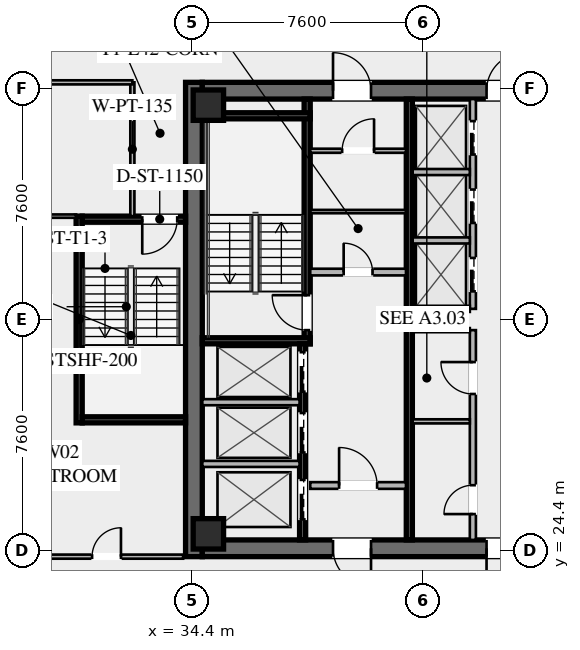
"""IFC4 building model, lengths in metres.
Left out: names, types, materials, properties, quantities, classifications, styles, units other than length and angle.
Written with IfcOpenShell. Run it as: python <this file> out.ifc"""

import sys

from ifc_helpers import new_model, si_unit, direction, frame, frame_2d, origin, origin_2d, place, context, subcontext, project, spatial, rectangle, hollow_rectangle, extrude, element, fill, save


model = new_model("IFC4")
c1 = context("Model", 3, precision=1e-05, world=origin(), true_north=direction((0.0, 1.0)))
c2 = subcontext(c1, "Body", "Model", "MODEL_VIEW")
j1 = project(units=[si_unit("LENGTHUNIT", "METRE"), si_unit("PLANEANGLEUNIT", "RADIAN")], contexts=[c1])
p1 = place(None, origin())
s1 = spatial("IfcSite", under=j1, at=p1, CompositionType="ELEMENT")
p2 = place(p1, origin())
s2 = spatial("IfcBuilding", under=s1, at=p2, CompositionType="ELEMENT")
p3 = place(p2, frame((0.0, 0.0, 157.0)))
s3 = spatial("IfcBuildingStorey", under=s2, at=p3, CompositionType="ELEMENT", Elevation=157.0)
p4 = place(p3, frame((34.475, 24.2, 0.0), z_axis=(0.0, 0.0, 1.0), x_axis=(0.0, 1.0, 0.0)))
e1 = element("IfcWall", 1, at=p4, inside=s3, PredefinedType="SHEAR", context=c2, shape_type="SweptSolid", body=[
    extrude(rectangle(XDim=15.6, YDim=0.55, at=frame_2d((7.8, 0.0))), origin(), (0.0, 0.0, 1.0), 3.55),
])
p5 = place(p3, frame((49.25, 24.475, 0.0), z_axis=(0.0, 0.0, 1.0), x_axis=(-1.0, 0.0, 0.0)))
e2 = element("IfcWall", 2, at=p5, inside=s3, PredefinedType="SHEAR", context=c2, shape_type="SweptSolid", body=[
    extrude(rectangle(XDim=14.5, YDim=0.55, at=frame_2d((7.25, 0.0))), origin(), (0.0, 0.0, 1.0), 3.55),
])
p6 = place(p5, frame((8.95, 0.0, 0.0)))
e3 = element("IfcOpeningElement", 3, at=p6, cuts=e2, PredefinedType="OPENING", context=c2, shape_type="SweptSolid", body=[
    extrude(rectangle(XDim=1.25, YDim=2.25, at=frame_2d((0.625, 1.125))), frame((0.0, 0.285, 0.0), z_axis=(0.0, -1.0, 0.0), x_axis=(1.0, 0.0, 0.0)), (0.0, 0.0, 1.0), 0.57),
])
p7 = place(p5, frame((3.9, 0.0, 0.0)))
e4 = element("IfcOpeningElement", 4, at=p7, cuts=e2, PredefinedType="OPENING", context=c2, shape_type="SweptSolid", body=[
    extrude(rectangle(XDim=1.25, YDim=2.25, at=frame_2d((0.625, 1.125))), frame((0.0, 0.285, 0.0), z_axis=(0.0, -1.0, 0.0), x_axis=(1.0, 0.0, 0.0)), (0.0, 0.0, 1.0), 0.57),
])
p8 = place(p3, frame((34.75, 39.525, 0.0), z_axis=(0.0, 0.0, 1.0), x_axis=(1.0, 0.0, 0.0)))
e5 = element("IfcWall", 5, at=p8, inside=s3, PredefinedType="SHEAR", context=c2, shape_type="SweptSolid", body=[
    extrude(rectangle(XDim=14.5, YDim=0.55, at=frame_2d((7.25, 0.0))), origin(), (0.0, 0.0, 1.0), 3.55),
])
p9 = place(p8, frame((4.3, 0.0, 0.0)))
e6 = element("IfcOpeningElement", 6, at=p9, cuts=e5, PredefinedType="OPENING", context=c2, shape_type="SweptSolid", body=[
    extrude(rectangle(XDim=1.25, YDim=2.25, at=frame_2d((0.625, 1.125))), frame((0.0, 0.285, 0.0), z_axis=(0.0, -1.0, 0.0), x_axis=(1.0, 0.0, 0.0)), (0.0, 0.0, 1.0), 0.57),
])
p10 = place(p8, frame((9.35, 0.0, 0.0)))
e7 = element("IfcOpeningElement", 7, at=p10, cuts=e5, PredefinedType="OPENING", context=c2, shape_type="SweptSolid", body=[
    extrude(rectangle(XDim=1.25, YDim=2.25, at=frame_2d((0.625, 1.125))), frame((0.0, 0.285, 0.0), z_axis=(0.0, -1.0, 0.0), x_axis=(1.0, 0.0, 0.0)), (0.0, 0.0, 1.0), 0.57),
])
for number, where, z_axis, x_axis in (
    (8, (34.95, 24.95, 0.0), (0.0, 0.0, 1.0), (1.0, 0.0, 0.0)),
    (9, (34.95, 39.05, 0.0), (0.0, 0.0, 1.0), (1.0, 0.0, 0.0)),
):
    element("IfcColumn", number, at=place(p3, frame(where, z_axis=z_axis, x_axis=x_axis)), inside=s3, PredefinedType="COLUMN", context=c2, shape_type="SweptSolid", body=[
        extrude(hollow_rectangle(XDim=1.0, YDim=1.0, WallThickness=0.04, at=origin_2d()), origin(), (0.0, 0.0, 1.0), 3.37),
    ])
p11 = place(p3, frame((38.2, 31.2, 0.0), z_axis=(0.0, 0.0, 1.0), x_axis=(0.0, 1.0, 0.0)))
e10 = element("IfcWall", 10, at=p11, inside=s3, PredefinedType="SHEAR", context=c2, shape_type="SweptSolid", body=[
    extrude(rectangle(XDim=8.05, YDim=0.2, at=frame_2d((4.025, 0.0))), origin(), (0.0, 0.0, 1.0), 3.37),
])
p12 = place(p11, frame((0.45, 0.0, 0.0)))
e11 = element("IfcOpeningElement", 11, at=p12, cuts=e10, PredefinedType="OPENING", context=c2, shape_type="SweptSolid", body=[
    extrude(rectangle(XDim=1.15, YDim=2.2, at=frame_2d((0.575, 1.1))), frame((0.0, 0.11, 0.0), z_axis=(0.0, -1.0, 0.0), x_axis=(1.0, 0.0, 0.0)), (0.0, 0.0, 1.0), 0.22),
])
for number, where, z_axis, x_axis in (
    (12, (34.75, 31.3, 0.0), (0.0, 0.0, 1.0), (1.0, 0.0, 0.0)),
    (13, (34.75, 38.7, 0.0), (0.0, 0.0, 1.0), (1.0, 0.0, 0.0)),
):
    element("IfcWall", number, at=place(p3, frame(where, z_axis=z_axis, x_axis=x_axis)), inside=s3, PredefinedType="SHEAR", context=c2, shape_type="SweptSolid", body=[
        extrude(rectangle(XDim=3.55, YDim=0.2, at=frame_2d((1.775, 0.0))), origin(), (0.0, 0.0, 1.0), 3.37),
    ])
p13 = place(p3, frame((41.56, 24.75, 0.0), z_axis=(0.0, 0.0, 1.0), x_axis=(0.0, 1.0, 0.0)))
e14 = element("IfcWall", 14, at=p13, inside=s3, PredefinedType="SHEAR", context=c2, shape_type="SweptSolid", body=[
    extrude(rectangle(XDim=14.5, YDim=0.2, at=frame_2d((7.25, 0.0))), origin(), (0.0, 0.0, 1.0), 3.37),
])
p14 = place(p3, frame((38.3, 33.56, 0.0), z_axis=(0.0, 0.0, 1.0), x_axis=(1.0, 0.0, 0.0)))
e15 = element("IfcWall", 15, at=p14, inside=s3, PredefinedType="SOLIDWALL", context=c2, shape_type="SweptSolid", body=[
    extrude(rectangle(XDim=3.15, YDim=0.22, at=frame_2d((1.575, 0.0))), origin(), (0.0, 0.0, 1.0), 2.723),
])
p15 = place(p14, frame((1.1, 0.0, 0.0)))
e16 = element("IfcOpeningElement", 16, at=p15, cuts=e15, PredefinedType="OPENING", context=c2, shape_type="SweptSolid", body=[
    extrude(rectangle(XDim=0.95, YDim=2.05, at=frame_2d((0.475, 1.025))), frame((0.0, 0.12, 0.0), z_axis=(0.0, -1.0, 0.0), x_axis=(1.0, 0.0, 0.0)), (0.0, 0.0, 1.0), 0.24),
])
p16 = place(p3, frame((38.3, 26.54, 0.0), z_axis=(0.0, 0.0, 1.0), x_axis=(1.0, 0.0, 0.0)))
e17 = element("IfcWall", 17, at=p16, inside=s3, PredefinedType="SOLIDWALL", context=c2, shape_type="SweptSolid", body=[
    extrude(rectangle(XDim=3.15, YDim=0.22, at=frame_2d((1.575, 0.0))), origin(), (0.0, 0.0, 1.0), 2.723),
])
p17 = place(p16, frame((0.95, 0.0, 0.0)))
e18 = element("IfcOpeningElement", 18, at=p17, cuts=e17, PredefinedType="OPENING", context=c2, shape_type="SweptSolid", body=[
    extrude(rectangle(XDim=1.25, YDim=2.25, at=frame_2d((0.625, 1.125))), frame((0.0, 0.12, 0.0), z_axis=(0.0, -1.0, 0.0), x_axis=(1.0, 0.0, 0.0)), (0.0, 0.0, 1.0), 0.24),
])
p18 = place(p3, frame((38.05, 24.75, 0.0), z_axis=(0.0, 0.0, 1.0), x_axis=(0.0, 1.0, 0.0)))
e19 = element("IfcWall", 19, at=p18, inside=s3, PredefinedType="SHEAR", context=c2, shape_type="SweptSolid", body=[
    extrude(rectangle(XDim=6.45, YDim=0.2, at=frame_2d((3.225, 0.0))), origin(), (0.0, 0.0, 1.0), 3.37),
])
p19 = place(p18, frame((4.875, 0.0, 0.0)))
e20 = element("IfcOpeningElement", 20, at=p19, cuts=e19, PredefinedType="OPENING", context=c2, shape_type="SweptSolid", body=[
    extrude(rectangle(XDim=1.3, YDim=2.25, at=frame_2d((0.65, 1.125))), frame((0.0, 0.11, 0.0), z_axis=(0.0, -1.0, 0.0), x_axis=(1.0, 0.0, 0.0)), (0.0, 0.0, 1.0), 0.22),
])
p20 = place(p18, frame((2.875, 0.0, 0.0)))
e21 = element("IfcOpeningElement", 21, at=p20, cuts=e19, PredefinedType="OPENING", context=c2, shape_type="SweptSolid", body=[
    extrude(rectangle(XDim=1.3, YDim=2.25, at=frame_2d((0.65, 1.125))), frame((0.0, 0.11, 0.0), z_axis=(0.0, -1.0, 0.0), x_axis=(1.0, 0.0, 0.0)), (0.0, 0.0, 1.0), 0.22),
])
p21 = place(p18, frame((0.675, 0.0, 0.0)))
e22 = element("IfcOpeningElement", 22, at=p21, cuts=e19, PredefinedType="OPENING", context=c2, shape_type="SweptSolid", body=[
    extrude(rectangle(XDim=1.3, YDim=2.25, at=frame_2d((0.65, 1.125))), frame((0.0, 0.11, 0.0), z_axis=(0.0, -1.0, 0.0), x_axis=(1.0, 0.0, 0.0)), (0.0, 0.0, 1.0), 0.22),
])
for number, where, z_axis, x_axis in (
    (23, (34.75, 27.25, 0.0), (0.0, 0.0, 1.0), (1.0, 0.0, 0.0)),
    (24, (34.75, 29.28, 0.0), (0.0, 0.0, 1.0), (1.0, 0.0, 0.0)),
):
    element("IfcWall", number, at=place(p3, frame(where, z_axis=z_axis, x_axis=x_axis)), inside=s3, PredefinedType="SOLIDWALL", context=c2, shape_type="SweptSolid", body=[
        extrude(rectangle(XDim=3.2, YDim=0.2, at=frame_2d((1.6, 0.0))), origin(), (0.0, 0.0, 1.0), 3.37),
    ])
p22 = place(p3, frame((38.3, 37.55, 0.0), z_axis=(0.0, 0.0, 1.0), x_axis=(1.0, 0.0, 0.0)))
e25 = element("IfcWall", 25, at=p22, inside=s3, PredefinedType="PARTITIONING", context=c2, shape_type="SweptSolid", body=[
    extrude(rectangle(XDim=3.15, YDim=0.135, at=frame_2d((1.575, 0.0))), origin(), (0.0, 0.0, 1.0), 2.723),
])
p23 = place(p22, frame((1.05, 0.0, 0.0)))
e26 = element("IfcOpeningElement", 26, at=p23, cuts=e25, PredefinedType="OPENING", context=c2, shape_type="SweptSolid", body=[
    extrude(rectangle(XDim=1.05, YDim=2.2, at=frame_2d((0.525, 1.1))), frame((0.0, 0.077, 0.0), z_axis=(0.0, -1.0, 0.0), x_axis=(1.0, 0.0, 0.0)), (0.0, 0.0, 1.0), 0.155),
])
p24 = place(p3, frame((38.3, 35.55, 0.0), z_axis=(0.0, 0.0, 1.0), x_axis=(1.0, 0.0, 0.0)))
e27 = element("IfcWall", 27, at=p24, inside=s3, PredefinedType="PARTITIONING", context=c2, shape_type="SweptSolid", body=[
    extrude(rectangle(XDim=3.15, YDim=0.11, at=frame_2d((1.575, 0.0))), origin(), (0.0, 0.0, 1.0), 2.723),
])
p25 = place(p3, frame((43.65, 24.75, 0.0), z_axis=(0.0, 0.0, 1.0), x_axis=(0.0, 1.0, 0.0)))
e28 = element("IfcWall", 28, at=p25, inside=s3, PredefinedType="SOLIDWALL", context=c2, shape_type="SweptSolid", body=[
    extrude(rectangle(XDim=6.9, YDim=0.2, at=frame_2d((3.45, 0.0))), origin(), (0.0, 0.0, 1.0), 2.723),
])
p26 = place(p25, frame((0.85, 0.0, 0.0)))
e29 = element("IfcOpeningElement", 29, at=p26, cuts=e28, PredefinedType="OPENING", context=c2, shape_type="SweptSolid", body=[
    extrude(rectangle(XDim=0.95, YDim=2.05, at=frame_2d((0.475, 1.025))), frame((0.0, 0.11, 0.0), z_axis=(0.0, -1.0, 0.0), x_axis=(1.0, 0.0, 0.0)), (0.0, 0.0, 1.0), 0.22),
])
p27 = place(p25, frame((4.8, 0.0, 0.0)))
e30 = element("IfcOpeningElement", 30, at=p27, cuts=e28, PredefinedType="OPENING", context=c2, shape_type="SweptSolid", body=[
    extrude(rectangle(XDim=1.05, YDim=2.2, at=frame_2d((0.525, 1.1))), frame((0.0, 0.11, 0.0), z_axis=(0.0, -1.0, 0.0), x_axis=(1.0, 0.0, 0.0)), (0.0, 0.0, 1.0), 0.22),
])
for number, where, z_axis, x_axis in (
    (31, (41.67, 31.65, 0.0), (0.0, 0.0, 1.0), (1.0, 0.0, 0.0)),
    (32, (41.67, 28.65, 0.0), (0.0, 0.0, 1.0), (1.0, 0.0, 0.0)),
):
    element("IfcWall", number, at=place(p3, frame(where, z_axis=z_axis, x_axis=x_axis)), inside=s3, PredefinedType="PARTITIONING", context=c2, shape_type="SweptSolid", body=[
        extrude(rectangle(XDim=1.88, YDim=0.135, at=frame_2d((0.94, 0.0))), origin(), (0.0, 0.0, 1.0), 2.723),
    ])
p28 = place(p3, frame((43.65, 32.35, 0.0), z_axis=(0.0, 0.0, 1.0), x_axis=(0.0, 1.0, 0.0)))
e33 = element("IfcWall", 33, at=p28, inside=s3, PredefinedType="SOLIDWALL", context=c2, shape_type="SweptSolid", body=[
    extrude(rectangle(XDim=6.9, YDim=0.2, at=frame_2d((3.45, 0.0))), origin(), (0.0, 0.0, 1.0), 3.37),
])
p29 = place(p28, frame((0.575, 0.0, 0.0)))
e34 = element("IfcOpeningElement", 34, at=p29, cuts=e33, PredefinedType="OPENING", context=c2, shape_type="SweptSolid", body=[
    extrude(rectangle(XDim=1.1, YDim=2.2, at=frame_2d((0.55, 1.1))), frame((0.0, 0.11, 0.0), z_axis=(0.0, -1.0, 0.0), x_axis=(1.0, 0.0, 0.0)), (0.0, 0.0, 1.0), 0.22),
])
p30 = place(p28, frame((2.825, 0.0, 0.0)))
e35 = element("IfcOpeningElement", 35, at=p30, cuts=e33, PredefinedType="OPENING", context=c2, shape_type="SweptSolid", body=[
    extrude(rectangle(XDim=1.1, YDim=2.2, at=frame_2d((0.55, 1.1))), frame((0.0, 0.11, 0.0), z_axis=(0.0, -1.0, 0.0), x_axis=(1.0, 0.0, 0.0)), (0.0, 0.0, 1.0), 0.22),
])
p31 = place(p28, frame((5.075, 0.0, 0.0)))
e36 = element("IfcOpeningElement", 36, at=p31, cuts=e33, PredefinedType="OPENING", context=c2, shape_type="SweptSolid", body=[
    extrude(rectangle(XDim=1.1, YDim=2.2, at=frame_2d((0.55, 1.1))), frame((0.0, 0.11, 0.0), z_axis=(0.0, -1.0, 0.0), x_axis=(1.0, 0.0, 0.0)), (0.0, 0.0, 1.0), 0.22),
])
for number, where, z_axis, x_axis in (
    (37, (41.67, 32.35, 0.0), (0.0, 0.0, 1.0), (1.0, 0.0, 0.0)),
    (38, (41.67, 34.6, 0.0), (0.0, 0.0, 1.0), (1.0, 0.0, 0.0)),
    (39, (41.67, 36.85, 0.0), (0.0, 0.0, 1.0), (1.0, 0.0, 0.0)),
):
    element("IfcWall", number, at=place(p3, frame(where, z_axis=z_axis, x_axis=x_axis)), inside=s3, PredefinedType="SOLIDWALL", context=c2, shape_type="SweptSolid", body=[
        extrude(rectangle(XDim=1.88, YDim=0.2, at=frame_2d((0.94, 0.0))), origin(), (0.0, 0.0, 1.0), 3.37),
    ])
p32 = place(p3, frame((30.7, 28.6, 0.0), z_axis=(0.0, 0.0, 1.0), x_axis=(0.0, 1.0, 0.0)))
e40 = element("IfcWall", 40, at=p32, inside=s3, PredefinedType="SHEAR", context=c2, shape_type="SweptSolid", body=[
    extrude(rectangle(XDim=6.8, YDim=0.2, at=frame_2d((3.4, 0.0))), origin(), (0.0, 0.0, 1.0), 3.37),
])
p33 = place(p3, frame((34.2, 35.3, 0.0), z_axis=(0.0, 0.0, 1.0), x_axis=(-1.0, 0.0, 0.0)))
e41 = element("IfcWall", 41, at=p33, inside=s3, PredefinedType="SHEAR", context=c2, shape_type="SweptSolid", body=[
    extrude(rectangle(XDim=3.4, YDim=0.2, at=frame_2d((1.7, 0.0))), origin(), (0.0, 0.0, 1.0), 3.37),
])
p34 = place(p33, frame((0.275, 0.0, 0.0)))
e42 = element("IfcOpeningElement", 42, at=p34, cuts=e41, PredefinedType="OPENING", context=c2, shape_type="SweptSolid", body=[
    extrude(rectangle(XDim=1.15, YDim=2.2, at=frame_2d((0.575, 1.1))), frame((0.0, 0.11, 0.0), z_axis=(0.0, -1.0, 0.0), x_axis=(1.0, 0.0, 0.0)), (0.0, 0.0, 1.0), 0.22),
])
p35 = place(p3, frame((30.8, 28.7, 0.0), z_axis=(0.0, 0.0, 1.0), x_axis=(1.0, 0.0, 0.0)))
e43 = element("IfcWall", 43, at=p35, inside=s3, PredefinedType="SHEAR", context=c2, shape_type="SweptSolid", body=[
    extrude(rectangle(XDim=3.4, YDim=0.2, at=frame_2d((1.7, 0.0))), origin(), (0.0, 0.0, 1.0), 3.37),
])
p36 = place(p3, frame((32.45, 35.4, 0.0), z_axis=(0.0, 0.0, 1.0), x_axis=(0.0, 1.0, 0.0)))
e44 = element("IfcWall", 44, at=p36, inside=s3, PredefinedType="PARTITIONING", context=c2, shape_type="SweptSolid", body=[
    extrude(rectangle(XDim=4.4, YDim=0.135, at=frame_2d((2.2, 0.0))), origin(), (0.0, 0.0, 1.0), 2.723),
])
p37 = place(p3, frame((32.45, 39.8, 0.0), z_axis=(0.0, 0.0, 1.0), x_axis=(-1.0, 0.0, 0.0)))
e45 = element("IfcWall", 45, at=p37, inside=s3, PredefinedType="PARTITIONING", context=c2, shape_type="SweptSolid", body=[
    extrude(rectangle(XDim=8.13, YDim=0.135, at=frame_2d((4.065, 0.0))), origin(), (0.0, 0.0, 1.0), 2.723),
])
p38 = place(p37, frame((3.24, 0.0, 0.0)))
e46 = element("IfcOpeningElement", 46, at=p38, cuts=e45, PredefinedType="OPENING", context=c2, shape_type="SweptSolid", body=[
    extrude(rectangle(XDim=0.95, YDim=2.05, at=frame_2d((0.475, 1.025))), frame((0.0, 0.077, 0.0), z_axis=(0.0, -1.0, 0.0), x_axis=(1.0, 0.0, 0.0)), (0.0, 0.0, 1.0), 0.155),
])
p39 = place(p3, frame((24.32, 24.2, 0.0), z_axis=(0.0, 0.0, 1.0), x_axis=(1.0, 0.0, 0.0)))
e47 = element("IfcWall", 47, at=p39, inside=s3, PredefinedType="PARTITIONING", context=c2, shape_type="SweptSolid", body=[
    extrude(rectangle(XDim=9.8, YDim=0.135, at=frame_2d((4.9, 0.0))), origin(), (0.0, 0.0, 1.0), 2.723),
])
p40 = place(p39, frame((6.805, 0.0, 0.0)))
e48 = element("IfcOpeningElement", 48, at=p40, cuts=e47, PredefinedType="OPENING", context=c2, shape_type="SweptSolid", body=[
    extrude(rectangle(XDim=0.95, YDim=2.05, at=frame_2d((0.475, 1.025))), frame((0.0, 0.077, 0.0), z_axis=(0.0, -1.0, 0.0), x_axis=(1.0, 0.0, 0.0)), (0.0, 0.0, 1.0), 0.155),
])
p41 = place(p3, frame((30.6, 35.4, 0.0), z_axis=(0.0, 0.0, 1.0), x_axis=(-1.0, 0.0, 0.0)))
e49 = element("IfcWall", 49, at=p41, inside=s3, PredefinedType="PARTITIONING", context=c2, shape_type="SweptSolid", body=[
    extrude(rectangle(XDim=6.28, YDim=0.11, at=frame_2d((3.14, 0.0))), origin(), (0.0, 0.0, 1.0), 2.723),
])
p42 = place(p9, origin())
e50 = element("IfcDoor", 50, at=p42, inside=s3, OperationType="SINGLE_SWING_LEFT", PredefinedType="DOOR", context=c2, shape_type="SweptSolid", body=[
    extrude(rectangle(XDim=1.25, YDim=2.25, at=frame_2d((0.625, 1.125))), frame((0.0, 0.025, 0.0), z_axis=(0.0, -1.0, 0.0), x_axis=(1.0, 0.0, 0.0)), (0.0, 0.0, 1.0), 0.05),
])
fill(e6, e50)
p43 = place(p10, origin())
e51 = element("IfcDoor", 51, at=p43, inside=s3, OperationType="SINGLE_SWING_RIGHT", PredefinedType="DOOR", context=c2, shape_type="SweptSolid", body=[
    extrude(rectangle(XDim=1.25, YDim=2.25, at=frame_2d((0.625, 1.125))), frame((0.0, 0.025, 0.0), z_axis=(0.0, -1.0, 0.0), x_axis=(1.0, 0.0, 0.0)), (0.0, 0.0, 1.0), 0.05),
])
fill(e7, e51)
p44 = place(p6, origin())
e52 = element("IfcDoor", 52, at=p44, inside=s3, OperationType="SINGLE_SWING_LEFT", PredefinedType="DOOR", context=c2, shape_type="SweptSolid", body=[
    extrude(rectangle(XDim=1.25, YDim=2.25, at=frame_2d((0.625, 1.125))), frame((0.0, 0.025, 0.0), z_axis=(0.0, -1.0, 0.0), x_axis=(1.0, 0.0, 0.0)), (0.0, 0.0, 1.0), 0.05),
])
fill(e3, e52)
p45 = place(p7, origin())
e53 = element("IfcDoor", 53, at=p45, inside=s3, OperationType="SINGLE_SWING_RIGHT", PredefinedType="DOOR", context=c2, shape_type="SweptSolid", body=[
    extrude(rectangle(XDim=1.25, YDim=2.25, at=frame_2d((0.625, 1.125))), frame((0.0, 0.025, 0.0), z_axis=(0.0, -1.0, 0.0), x_axis=(1.0, 0.0, 0.0)), (0.0, 0.0, 1.0), 0.05),
])
fill(e4, e53)
p46 = place(p12, origin())
e54 = element("IfcDoor", 54, at=p46, inside=s3, OperationType="SINGLE_SWING_RIGHT", PredefinedType="DOOR", context=c2, shape_type="SweptSolid", body=[
    extrude(rectangle(XDim=1.15, YDim=2.2, at=frame_2d((0.575, 1.1))), frame((0.0, 0.025, 0.0), z_axis=(0.0, -1.0, 0.0), x_axis=(1.0, 0.0, 0.0)), (0.0, 0.0, 1.0), 0.05),
])
fill(e11, e54)
p47 = place(p17, origin())
e55 = element("IfcDoor", 55, at=p47, inside=s3, OperationType="SINGLE_SWING_LEFT", PredefinedType="DOOR", context=c2, shape_type="SweptSolid", body=[
    extrude(rectangle(XDim=1.25, YDim=2.25, at=frame_2d((0.625, 1.125))), frame((0.0, 0.025, 0.0), z_axis=(0.0, -1.0, 0.0), x_axis=(1.0, 0.0, 0.0)), (0.0, 0.0, 1.0), 0.05),
])
fill(e18, e55)
p48 = place(p23, origin())
e56 = element("IfcDoor", 56, at=p48, inside=s3, OperationType="SINGLE_SWING_RIGHT", PredefinedType="DOOR", context=c2, shape_type="SweptSolid", body=[
    extrude(rectangle(XDim=1.05, YDim=2.2, at=frame_2d((0.525, 1.1))), frame((0.0, 0.025, 0.0), z_axis=(0.0, -1.0, 0.0), x_axis=(1.0, 0.0, 0.0)), (0.0, 0.0, 1.0), 0.05),
])
fill(e26, e56)
p49 = place(p15, origin())
e57 = element("IfcDoor", 57, at=p49, inside=s3, OperationType="SINGLE_SWING_LEFT", PredefinedType="DOOR", context=c2, shape_type="SweptSolid", body=[
    extrude(rectangle(XDim=0.95, YDim=2.05, at=frame_2d((0.475, 1.025))), frame((0.0, 0.025, 0.0), z_axis=(0.0, -1.0, 0.0), x_axis=(1.0, 0.0, 0.0)), (0.0, 0.0, 1.0), 0.05),
])
fill(e16, e57)
p50 = place(p26, origin())
e58 = element("IfcDoor", 58, at=p50, inside=s3, OperationType="SINGLE_SWING_LEFT", PredefinedType="DOOR", context=c2, shape_type="SweptSolid", body=[
    extrude(rectangle(XDim=0.95, YDim=2.05, at=frame_2d((0.475, 1.025))), frame((0.0, 0.025, 0.0), z_axis=(0.0, -1.0, 0.0), x_axis=(1.0, 0.0, 0.0)), (0.0, 0.0, 1.0), 0.05),
])
fill(e29, e58)
p51 = place(p27, origin())
e59 = element("IfcDoor", 59, at=p51, inside=s3, OperationType="SINGLE_SWING_RIGHT", PredefinedType="DOOR", context=c2, shape_type="SweptSolid", body=[
    extrude(rectangle(XDim=1.05, YDim=2.2, at=frame_2d((0.525, 1.1))), frame((0.0, 0.025, 0.0), z_axis=(0.0, -1.0, 0.0), x_axis=(1.0, 0.0, 0.0)), (0.0, 0.0, 1.0), 0.05),
])
fill(e30, e59)
p52 = place(p34, origin())
e60 = element("IfcDoor", 60, at=p52, inside=s3, OperationType="SINGLE_SWING_RIGHT", PredefinedType="DOOR", context=c2, shape_type="SweptSolid", body=[
    extrude(rectangle(XDim=1.15, YDim=2.2, at=frame_2d((0.575, 1.1))), frame((0.0, 0.025, 0.0), z_axis=(0.0, -1.0, 0.0), x_axis=(1.0, 0.0, 0.0)), (0.0, 0.0, 1.0), 0.05),
])
fill(e42, e60)
p53 = place(p40, origin())
e61 = element("IfcDoor", 61, at=p53, inside=s3, OperationType="SINGLE_SWING_RIGHT", PredefinedType="DOOR", context=c2, shape_type="SweptSolid", body=[
    extrude(rectangle(XDim=0.95, YDim=2.05, at=frame_2d((0.475, 1.025))), frame((0.0, 0.025, 0.0), z_axis=(0.0, -1.0, 0.0), x_axis=(1.0, 0.0, 0.0)), (0.0, 0.0, 1.0), 0.05),
])
fill(e48, e61)
p54 = place(p19, origin())
e62 = element("IfcDoor", 62, at=p54, inside=s3, OperationType="SLIDING_TO_LEFT", PredefinedType="DOOR", context=c2, shape_type="SweptSolid", body=[
    extrude(rectangle(XDim=1.3, YDim=2.25, at=frame_2d((0.65, 1.125))), frame((0.0, 0.025, 0.0), z_axis=(0.0, -1.0, 0.0), x_axis=(1.0, 0.0, 0.0)), (0.0, 0.0, 1.0), 0.05),
])
fill(e20, e62)
p55 = place(p20, origin())
e63 = element("IfcDoor", 63, at=p55, inside=s3, OperationType="SLIDING_TO_LEFT", PredefinedType="DOOR", context=c2, shape_type="SweptSolid", body=[
    extrude(rectangle(XDim=1.3, YDim=2.25, at=frame_2d((0.65, 1.125))), frame((0.0, 0.025, 0.0), z_axis=(0.0, -1.0, 0.0), x_axis=(1.0, 0.0, 0.0)), (0.0, 0.0, 1.0), 0.05),
])
fill(e21, e63)
p56 = place(p21, origin())
e64 = element("IfcDoor", 64, at=p56, inside=s3, OperationType="SLIDING_TO_LEFT", PredefinedType="DOOR", context=c2, shape_type="SweptSolid", body=[
    extrude(rectangle(XDim=1.3, YDim=2.25, at=frame_2d((0.65, 1.125))), frame((0.0, 0.025, 0.0), z_axis=(0.0, -1.0, 0.0), x_axis=(1.0, 0.0, 0.0)), (0.0, 0.0, 1.0), 0.05),
])
fill(e22, e64)
p57 = place(p29, origin())
e65 = element("IfcDoor", 65, at=p57, inside=s3, OperationType="SLIDING_TO_LEFT", PredefinedType="DOOR", context=c2, shape_type="SweptSolid", body=[
    extrude(rectangle(XDim=1.1, YDim=2.2, at=frame_2d((0.55, 1.1))), frame((0.0, 0.025, 0.0), z_axis=(0.0, -1.0, 0.0), x_axis=(1.0, 0.0, 0.0)), (0.0, 0.0, 1.0), 0.05),
])
fill(e34, e65)
p58 = place(p30, origin())
e66 = element("IfcDoor", 66, at=p58, inside=s3, OperationType="SLIDING_TO_LEFT", PredefinedType="DOOR", context=c2, shape_type="SweptSolid", body=[
    extrude(rectangle(XDim=1.1, YDim=2.2, at=frame_2d((0.55, 1.1))), frame((0.0, 0.025, 0.0), z_axis=(0.0, -1.0, 0.0), x_axis=(1.0, 0.0, 0.0)), (0.0, 0.0, 1.0), 0.05),
])
fill(e35, e66)
p59 = place(p31, origin())
e67 = element("IfcDoor", 67, at=p59, inside=s3, OperationType="SLIDING_TO_LEFT", PredefinedType="DOOR", context=c2, shape_type="SweptSolid", body=[
    extrude(rectangle(XDim=1.1, YDim=2.2, at=frame_2d((0.55, 1.1))), frame((0.0, 0.025, 0.0), z_axis=(0.0, -1.0, 0.0), x_axis=(1.0, 0.0, 0.0)), (0.0, 0.0, 1.0), 0.05),
])
fill(e36, e67)
save(model, sys.argv[1])
